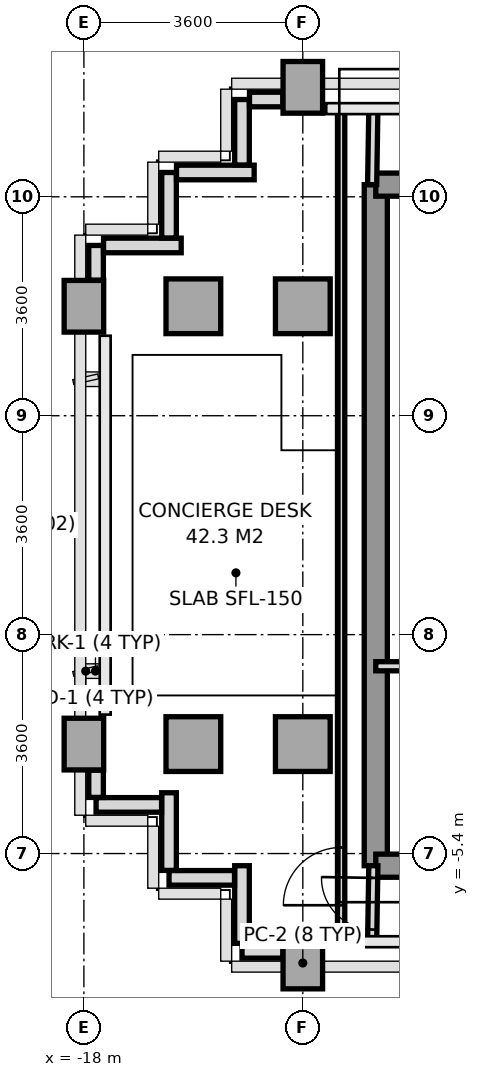
"""IFC4 building model, lengths in metres.
Left out: names, types, materials, properties, quantities, classifications, styles, units other than length and angle.
Written with IfcOpenShell. Run it as: python <this file> out.ifc"""

import sys

from ifc_helpers import new_model, si_unit, direction, frame, frame_2d, origin, origin_2d, place, context, subcontext, project, spatial, rectangle, extrude, source, transform, mapped, element, fill, save


model = new_model("IFC4")
c1 = context("Model", 3, precision=1e-05, world=origin(), true_north=direction((0.0, 1.0)))
c2 = subcontext(c1, "Body", "Model", "MODEL_VIEW")
j1 = project(units=[si_unit("LENGTHUNIT", "METRE"), si_unit("PLANEANGLEUNIT", "RADIAN")], contexts=[c1])
p1 = place(None, origin())
s1 = spatial("IfcSite", under=j1, at=p1, CompositionType="ELEMENT")
p2 = place(p1, origin())
s2 = spatial("IfcBuilding", under=s1, at=p2, CompositionType="ELEMENT")
p3 = place(p2, frame((0.0, 0.0, 177.4)))
s3 = spatial("IfcBuildingStorey", under=s2, at=p3, CompositionType="ELEMENT", Elevation=177.4)
m1 = source(origin(), c2, "Body", "SweptSolid", [
    extrude(rectangle(XDim=0.65, YDim=0.85, at=origin_2d()), origin(), (0.0, 0.0, 1.0), 3.2),
])
for number, where, z_axis, x_axis in (
    (1, (-18.0, -3.6, 0.0), (0.0, 0.0, 1.0), (1.0, 0.0, 0.0)),
    (2, (-18.0, 3.6, 0.0), (0.0, 0.0, 1.0), (1.0, 0.0, 0.0)),
):
    element("IfcColumn", number, at=place(p3, frame(where, z_axis=z_axis, x_axis=x_axis)), inside=s3, PredefinedType="COLUMN", context=c2, shape_type="MappedRepresentation", body=[
        mapped(m1, transform((0.0, 0.0, 0.0), x_axis=(1.0, 0.0, 0.0), y_axis=(0.0, 1.0, 0.0), z_axis=(0.0, 0.0, 1.0), scale=1.0)),
    ])
m2 = source(origin(), c2, "Body", "SweptSolid", [
    extrude(rectangle(XDim=0.9, YDim=0.9, at=origin_2d()), origin(), (0.0, 0.0, 1.0), 3.2),
])
for number, where, z_axis, x_axis in (
    (3, (-16.2, -3.6, 0.0), (0.0, 0.0, 1.0), (1.0, 0.0, 0.0)),
    (4, (-16.2, 3.6, 0.0), (0.0, 0.0, 1.0), (1.0, 0.0, 0.0)),
):
    element("IfcColumn", number, at=place(p3, frame(where, z_axis=z_axis, x_axis=x_axis)), inside=s3, PredefinedType="COLUMN", context=c2, shape_type="MappedRepresentation", body=[
        mapped(m2, transform((0.0, 0.0, 0.0), x_axis=(1.0, 0.0, 0.0), y_axis=(0.0, 1.0, 0.0), z_axis=(0.0, 0.0, 1.0), scale=1.0)),
    ])
p4 = place(p3, frame((-14.4, -7.2, 0.0), z_axis=(0.0, 0.0, 1.0), x_axis=(1.0, 0.0, 0.0)))
e5 = element("IfcColumn", 5, at=p4, inside=s3, PredefinedType="COLUMN", context=c2, shape_type="MappedRepresentation", body=[
    mapped(m1, transform((0.0, 0.0, 0.0), x_axis=(1.0, 0.0, 0.0), y_axis=(0.0, 1.0, 0.0), z_axis=(0.0, 0.0, 1.0), scale=1.0)),
])
for number, where, z_axis, x_axis in (
    (6, (-14.4, -3.6, 0.0), (0.0, 0.0, 1.0), (1.0, 0.0, 0.0)),
    (7, (-14.4, 3.6, 0.0), (0.0, 0.0, 1.0), (1.0, 0.0, 0.0)),
):
    element("IfcColumn", number, at=place(p3, frame(where, z_axis=z_axis, x_axis=x_axis)), inside=s3, PredefinedType="COLUMN", context=c2, shape_type="MappedRepresentation", body=[
        mapped(m2, transform((0.0, 0.0, 0.0), x_axis=(1.0, 0.0, 0.0), y_axis=(0.0, 1.0, 0.0), z_axis=(0.0, 0.0, 1.0), scale=1.0)),
    ])
p5 = place(p3, frame((-14.4, 7.2, 0.0), z_axis=(0.0, 0.0, 1.0), x_axis=(1.0, 0.0, 0.0)))
e8 = element("IfcColumn", 8, at=p5, inside=s3, PredefinedType="COLUMN", context=c2, shape_type="MappedRepresentation", body=[
    mapped(m1, transform((0.0, 0.0, 0.0), x_axis=(1.0, 0.0, 0.0), y_axis=(0.0, 1.0, 0.0), z_axis=(0.0, 0.0, 1.0), scale=1.0)),
])
p6 = place(p3, frame((-14.728, -7.0, 0.0), z_axis=(0.0, 0.0, 1.0), x_axis=(-1.0, 0.0, 0.0)))
e9 = element("IfcWall", 9, at=p6, inside=s3, PredefinedType="PARAPET", context=c2, shape_type="SweptSolid", body=[
    extrude(rectangle(XDim=0.672, YDim=0.24, at=frame_2d((0.336, 0.0))), origin(), (0.0, 0.0, 1.0), 1.15),
])
p7 = place(p3, frame((-15.4, -6.877, 0.0), z_axis=(0.0, 0.0, 1.0), x_axis=(0.0, 1.0, 0.0)))
e10 = element("IfcWall", 10, at=p7, inside=s3, PredefinedType="PARAPET", context=c2, shape_type="SweptSolid", body=[
    extrude(rectangle(XDim=1.277, YDim=0.24, at=frame_2d((0.638, 0.0))), origin(), (0.0, 0.0, 1.0), 1.15),
])
p8 = place(p3, frame((-15.523, -5.8, 0.0), z_axis=(0.0, 0.0, 1.0), x_axis=(-1.0, 0.0, 0.0)))
e11 = element("IfcWall", 11, at=p8, inside=s3, PredefinedType="PARAPET", context=c2, shape_type="SweptSolid", body=[
    extrude(rectangle(XDim=1.077, YDim=0.24, at=frame_2d((0.539, 0.0))), origin(), (0.0, 0.0, 1.0), 1.15),
])
p9 = place(p3, frame((-16.6, -5.677, 0.0), z_axis=(0.0, 0.0, 1.0), x_axis=(0.0, 1.0, 0.0)))
e12 = element("IfcWall", 12, at=p9, inside=s3, PredefinedType="PARAPET", context=c2, shape_type="SweptSolid", body=[
    extrude(rectangle(XDim=1.277, YDim=0.24, at=frame_2d((0.639, 0.0))), origin(), (0.0, 0.0, 1.0), 1.15),
])
p10 = place(p3, frame((-16.723, -4.6, 0.0), z_axis=(0.0, 0.0, 1.0), x_axis=(-1.0, 0.0, 0.0)))
e13 = element("IfcWall", 13, at=p10, inside=s3, PredefinedType="PARAPET", context=c2, shape_type="SweptSolid", body=[
    extrude(rectangle(XDim=1.077, YDim=0.24, at=frame_2d((0.539, 0.0))), origin(), (0.0, 0.0, 1.0), 1.15),
])
p11 = place(p3, frame((-17.8, -4.477, 0.0), z_axis=(0.0, 0.0, 1.0), x_axis=(0.0, 1.0, 0.0)))
e14 = element("IfcWall", 14, at=p11, inside=s3, PredefinedType="PARAPET", context=c2, shape_type="SweptSolid", body=[
    extrude(rectangle(XDim=0.449, YDim=0.24, at=frame_2d((0.225, 0.0))), origin(), (0.0, 0.0, 1.0), 1.15),
])
p12 = place(p3, frame((-17.8, 4.028, 0.0), z_axis=(0.0, 0.0, 1.0), x_axis=(0.0, 1.0, 0.0)))
e15 = element("IfcWall", 15, at=p12, inside=s3, PredefinedType="PARAPET", context=c2, shape_type="SweptSolid", body=[
    extrude(rectangle(XDim=0.572, YDim=0.24, at=frame_2d((0.286, 0.0))), origin(), (0.0, 0.0, 1.0), 1.15),
])
p13 = place(p3, frame((-17.677, 4.6, 0.0), z_axis=(0.0, 0.0, 1.0), x_axis=(1.0, 0.0, 0.0)))
e16 = element("IfcWall", 16, at=p13, inside=s3, PredefinedType="PARAPET", context=c2, shape_type="SweptSolid", body=[
    extrude(rectangle(XDim=1.277, YDim=0.24, at=frame_2d((0.639, 0.0))), origin(), (0.0, 0.0, 1.0), 1.15),
])
p14 = place(p3, frame((-16.6, 4.723, 0.0), z_axis=(0.0, 0.0, 1.0), x_axis=(0.0, 1.0, 0.0)))
e17 = element("IfcWall", 17, at=p14, inside=s3, PredefinedType="PARAPET", context=c2, shape_type="SweptSolid", body=[
    extrude(rectangle(XDim=1.077, YDim=0.24, at=frame_2d((0.539, 0.0))), origin(), (0.0, 0.0, 1.0), 1.15),
])
p15 = place(p3, frame((-16.477, 5.8, 0.0), z_axis=(0.0, 0.0, 1.0), x_axis=(1.0, 0.0, 0.0)))
e18 = element("IfcWall", 18, at=p15, inside=s3, PredefinedType="PARAPET", context=c2, shape_type="SweptSolid", body=[
    extrude(rectangle(XDim=1.277, YDim=0.24, at=frame_2d((0.639, 0.0))), origin(), (0.0, 0.0, 1.0), 1.15),
])
p16 = place(p3, frame((-15.4, 5.923, 0.0), z_axis=(0.0, 0.0, 1.0), x_axis=(0.0, 1.0, 0.0)))
e19 = element("IfcWall", 19, at=p16, inside=s3, PredefinedType="PARAPET", context=c2, shape_type="SweptSolid", body=[
    extrude(rectangle(XDim=1.077, YDim=0.24, at=frame_2d((0.539, 0.0))), origin(), (0.0, 0.0, 1.0), 1.15),
])
p17 = place(p3, frame((-15.277, 7.0, 0.0), z_axis=(0.0, 0.0, 1.0), x_axis=(1.0, 0.0, 0.0)))
e20 = element("IfcWall", 20, at=p17, inside=s3, PredefinedType="PARAPET", context=c2, shape_type="SweptSolid", body=[
    extrude(rectangle(XDim=0.549, YDim=0.24, at=frame_2d((0.274, 0.0))), origin(), (0.0, 0.0, 1.0), 1.15),
])
p18 = place(p3, frame((-13.2, -5.6, 0.0), z_axis=(0.0, 0.0, 1.0), x_axis=(0.0, 1.0, 0.0)))
e21 = element("IfcWall", 21, at=p18, inside=s3, PredefinedType="SHEAR", context=c2, shape_type="SweptSolid", body=[
    extrude(rectangle(XDim=11.2, YDim=0.38, at=frame_2d((5.6, 0.0))), origin(), (0.0, 0.0, 1.0), 3.2),
])
p19 = place(p3, frame((-13.2, 5.6, 0.0), z_axis=(0.0, 0.0, 1.0), x_axis=(1.0, 0.0, 0.0)))
e22 = element("IfcWall", 22, at=p19, inside=s3, PredefinedType="SHEAR", context=c2, shape_type="SweptSolid", body=[
    extrude(rectangle(XDim=1.844, YDim=0.38, at=frame_2d((0.922, 0.0))), origin(), (0.0, 0.0, 1.0), 3.2),
])
p20 = place(p3, frame((-13.2, -5.6, 0.0), z_axis=(0.0, 0.0, 1.0), x_axis=(1.0, 0.0, 0.0)))
e23 = element("IfcWall", 23, at=p20, inside=s3, PredefinedType="SHEAR", context=c2, shape_type="SweptSolid", body=[
    extrude(rectangle(XDim=7.8, YDim=0.38, at=frame_2d((3.9, 0.0))), origin(), (0.0, 0.0, 1.0), 3.2),
])
p21 = place(p20, frame((3.6, 0.0, 0.0)))
e24 = element("IfcOpeningElement", 24, at=p21, cuts=e23, PredefinedType="OPENING", context=c2, shape_type="SweptSolid", body=[
    extrude(rectangle(XDim=1.2, YDim=2.2, at=frame_2d((0.6, 1.1))), frame((0.0, 0.2, 0.0), z_axis=(0.0, -1.0, 0.0), x_axis=(1.0, 0.0, 0.0)), (0.0, 0.0, 1.0), 0.4),
])
p22 = place(p20, frame((0.65, 0.0, 0.0)))
e25 = element("IfcOpeningElement", 25, at=p22, cuts=e23, PredefinedType="OPENING", context=c2, shape_type="SweptSolid", body=[
    extrude(rectangle(XDim=0.8, YDim=2.1, at=frame_2d((0.4, 1.05))), frame((0.0, 0.2, 0.0), z_axis=(0.0, -1.0, 0.0), x_axis=(1.0, 0.0, 0.0)), (0.0, 0.0, 1.0), 0.4),
])
p23 = place(p3, frame((-13.2, -2.32, 0.0), z_axis=(0.0, 0.0, 1.0), x_axis=(1.0, 0.0, 0.0)))
e26 = element("IfcWall", 26, at=p23, inside=s3, PredefinedType="PARTITIONING", context=c2, shape_type="SweptSolid", body=[
    extrude(rectangle(XDim=2.18, YDim=0.15, at=frame_2d((1.09, 0.0))), origin(), (0.0, 0.0, 1.0), 3.2),
])
p24 = place(p3, frame((-13.26, 5.6, 0.0), z_axis=(0.0, 0.0, 1.0), x_axis=(0.016013571389, 0.999871774545, 0.0)))
e27 = element("IfcWall", 27, at=p24, inside=s3, PredefinedType="PARTITIONING", context=c2, shape_type="SweptSolid", body=[
    extrude(rectangle(XDim=1.25, YDim=0.15, at=frame_2d((0.625, 0.0))), origin(), (0.0, 0.0, 1.0), 3.2),
])
p25 = place(p3, frame((-13.26, -6.85, 0.0), z_axis=(0.0, 0.0, 1.0), x_axis=(0.016013571389, 0.999871774545, 0.0)))
e28 = element("IfcWall", 28, at=p25, inside=s3, PredefinedType="PARTITIONING", context=c2, shape_type="SweptSolid", body=[
    extrude(rectangle(XDim=1.25, YDim=0.15, at=frame_2d((0.625, 0.0))), origin(), (0.0, 0.0, 1.0), 3.2),
])
p26 = place(p25, frame((0.2, 0.0, 0.0)))
e29 = element("IfcOpeningElement", 29, at=p26, cuts=e28, PredefinedType="OPENING", context=c2, shape_type="SweptSolid", body=[
    extrude(rectangle(XDim=0.85, YDim=2.1, at=frame_2d((0.425, 1.05))), frame((0.0, 0.085, 0.0), z_axis=(0.0, -1.0, 0.0), x_axis=(1.0, 0.0, 0.0)), (0.0, 0.0, 1.0), 0.17),
])
p27 = place(p3, frame((-13.77, -6.85, 0.0), z_axis=(0.0, 0.0, 1.0), x_axis=(0.0, 1.0, 0.0)))
e30 = element("IfcWall", 30, at=p27, inside=s3, PredefinedType="PARTITIONING", context=c2, shape_type="SweptSolid", body=[
    extrude(rectangle(XDim=13.7, YDim=0.12, at=frame_2d((6.85, 0.0))), origin(), (0.0, 0.0, 1.0), 2.87),
])
p28 = place(p27, frame((0.6, 0.0, 0.0)))
e31 = element("IfcOpeningElement", 31, at=p28, cuts=e30, PredefinedType="OPENING", context=c2, shape_type="SweptSolid", body=[
    extrude(rectangle(XDim=0.95, YDim=2.15, at=frame_2d((0.475, 1.075))), frame((0.0, 0.07, 0.0), z_axis=(0.0, -1.0, 0.0), x_axis=(1.0, 0.0, 0.0)), (0.0, 0.0, 1.0), 0.14),
])
m3 = source(origin(), c2, "Body", "SweptSolid", [
    extrude(rectangle(XDim=0.95, YDim=2.15, at=frame_2d((0.475, 1.075))), frame((0.0, 0.025, 0.0), z_axis=(0.0, -1.0, 0.0), x_axis=(1.0, 0.0, 0.0)), (0.0, 0.0, 1.0), 0.05),
])
p29 = place(p28, origin())
e32 = element("IfcDoor", 32, at=p29, inside=s3, OperationType="SINGLE_SWING_LEFT", PredefinedType="DOOR", context=c2, shape_type="MappedRepresentation", body=[
    mapped(m3, transform((0.0, 0.0, 0.0), x_axis=(1.0, 0.0, 0.0), y_axis=(0.0, 1.0, 0.0), z_axis=(0.0, 0.0, 1.0), scale=1.0)),
])
fill(e31, e32)
m4 = source(origin(), c2, "Body", "SweptSolid", [
    extrude(rectangle(XDim=0.85, YDim=2.1, at=frame_2d((0.425, 1.05))), frame((0.0, 0.025, 0.0), z_axis=(0.0, -1.0, 0.0), x_axis=(1.0, 0.0, 0.0)), (0.0, 0.0, 1.0), 0.05),
])
p30 = place(p26, origin())
e33 = element("IfcDoor", 33, at=p30, inside=s3, OperationType="SINGLE_SWING_RIGHT", PredefinedType="DOOR", context=c2, shape_type="MappedRepresentation", body=[
    mapped(m4, transform((0.0, 0.0, 0.0), x_axis=(1.0, 0.0, 0.0), y_axis=(0.0, 1.0, 0.0), z_axis=(0.0, 0.0, 1.0), scale=1.0)),
])
fill(e29, e33)
save(model, sys.argv[1])
